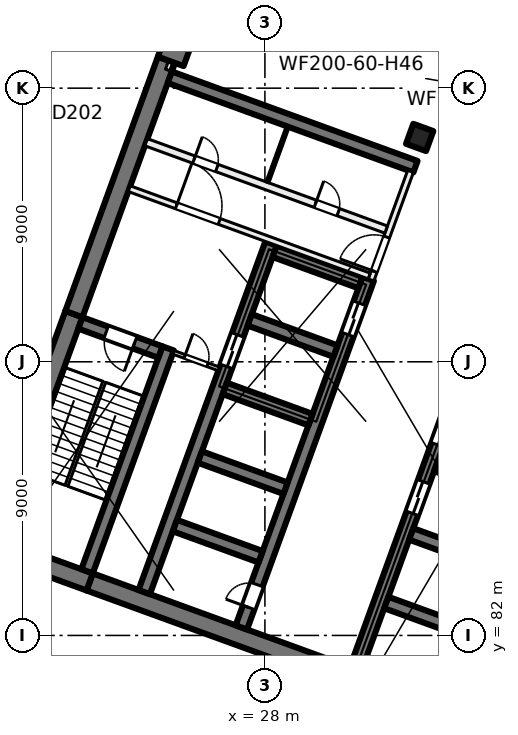
"""IFC4 building model, lengths in metres.
Left out: names, types, materials, properties, quantities, classifications, styles, units other than length and angle.
Written with IfcOpenShell. Run it as: python <this file> out.ifc"""

import sys

from ifc_helpers import new_model, si_unit, direction, frame, frame_2d, origin, origin_2d, place, context, subcontext, project, spatial, rectangle, extrude, element, fill, save


model = new_model("IFC4")
c1 = context("Model", 3, precision=1e-05, world=origin(), true_north=direction((0.0, 1.0)))
c2 = subcontext(c1, "Body", "Model", "MODEL_VIEW")
j1 = project(units=[si_unit("LENGTHUNIT", "METRE"), si_unit("PLANEANGLEUNIT", "RADIAN")], contexts=[c1])
p1 = place(None, origin())
s1 = spatial("IfcSite", under=j1, at=p1, CompositionType="ELEMENT")
p2 = place(p1, origin())
s2 = spatial("IfcBuilding", under=s1, at=p2, CompositionType="ELEMENT")
p3 = place(p2, frame((0.0, 0.0, 12.5)))
s3 = spatial("IfcBuildingStorey", under=s2, at=p3, CompositionType="ELEMENT", Elevation=12.5)
p4 = place(p3, frame((33.091, 98.379, 0.0), z_axis=(0.0, 0.0, 1.0), x_axis=(-0.342020143326, -0.939692620786, 0.0)))
e1 = element("IfcColumn", 1, at=p4, inside=s3, PredefinedType="COLUMN", context=c2, shape_type="SweptSolid", body=[
    extrude(rectangle(XDim=0.7, YDim=0.7, at=origin_2d()), origin(), (0.0, 0.0, 1.0), 5.0),
])
p5 = place(p3, frame((25.056, 101.303, 0.0), z_axis=(0.0, 0.0, 1.0), x_axis=(-0.342020143326, -0.939692620786, 0.0)))
e2 = element("IfcColumn", 2, at=p5, inside=s3, PredefinedType="COLUMN", context=c2, shape_type="SweptSolid", body=[
    extrude(rectangle(XDim=0.9, YDim=0.9, at=origin_2d()), origin(), (0.0, 0.0, 1.0), 5.0),
])
p6 = place(p3, frame((35.767, 78.835, 0.0), z_axis=(0.0, 0.0, 1.0), x_axis=(-0.939692894512, 0.342019391267, 0.0)))
e3 = element("IfcWall", 3, at=p6, inside=s3, PredefinedType="SHEAR", context=c2, shape_type="SweptSolid", body=[
    extrude(rectangle(XDim=14.4, YDim=0.6, at=frame_2d((7.2, 0.0))), origin(), (0.0, 0.0, 1.0), 5.0),
])
p7 = place(p3, frame((22.236, 83.76, 0.0), z_axis=(0.0, 0.0, 1.0), x_axis=(-0.939680822529, 0.342052557032, 0.0)))
e4 = element("IfcWall", 4, at=p7, inside=s3, PredefinedType="SHEAR", context=c2, shape_type="SweptSolid", body=[
    extrude(rectangle(XDim=3.8, YDim=0.6, at=frame_2d((1.9, 0.0))), origin(), (0.0, 0.0, 1.0), 5.0),
])
p8 = place(p3, frame((19.05, 85.239, 0.0), z_axis=(0.0, 0.0, 1.0), x_axis=(0.342016982193, 0.939693771338, 0.0)))
e5 = element("IfcWall", 5, at=p8, inside=s3, PredefinedType="SHEAR", context=c2, shape_type="SweptSolid", body=[
    extrude(rectangle(XDim=7.8, YDim=0.6, at=frame_2d((3.9, 0.0))), origin(), (0.0, 0.0, 1.0), 5.0),
])
p9 = place(p3, frame((21.717, 92.568, 0.0), z_axis=(0.0, 0.0, 1.0), x_axis=(0.342016162452, 0.939694069696, 0.0)))
e6 = element("IfcWall", 6, at=p9, inside=s3, PredefinedType="SHEAR", context=c2, shape_type="SweptSolid", body=[
    extrude(rectangle(XDim=8.9, YDim=0.6, at=frame_2d((4.45, 0.0))), origin(), (0.0, 0.0, 1.0), 5.0),
])
p10 = place(p3, frame((22.15, 84.11, 0.0), z_axis=(0.0, 0.0, 1.0), x_axis=(0.342016982193, 0.939693771338, 0.0)))
e7 = element("IfcWall", 7, at=p10, inside=s3, PredefinedType="SHEAR", context=c2, shape_type="SweptSolid", body=[
    extrude(rectangle(XDim=7.8, YDim=0.4, at=frame_2d((3.9, 0.0))), origin(), (0.0, 0.0, 1.0), 5.0),
])
p11 = place(p3, frame((24.562, 91.32, 0.0), z_axis=(0.0, 0.0, 1.0), x_axis=(-0.939717030584, 0.341953070509, 0.0)))
e8 = element("IfcWall", 8, at=p11, inside=s3, PredefinedType="SHEAR", context=c2, shape_type="SweptSolid", body=[
    extrude(rectangle(XDim=2.8, YDim=0.4, at=frame_2d((1.4, 0.0))), origin(), (0.0, 0.0, 1.0), 5.0),
])
p12 = place(p11, frame((0.9, 0.0, 0.0)))
e9 = element("IfcOpeningElement", 9, at=p12, cuts=e8, PredefinedType="OPENING", context=c2, shape_type="SweptSolid", body=[
    extrude(rectangle(XDim=1.0, YDim=2.1, at=frame_2d((0.5, 1.05))), frame((0.0, 0.21, 0.0), z_axis=(0.0, -1.0, 0.0), x_axis=(1.0, 0.0, 0.0)), (0.0, 0.0, 1.0), 0.42),
])
p13 = place(p3, frame((30.984, 80.895, 0.0), z_axis=(0.0, 0.0, 1.0), x_axis=(0.342021021735, 0.939692301071, 0.0)))
e10 = element("IfcWall", 10, at=p13, inside=s3, PredefinedType="SHEAR", context=c2, shape_type="SweptSolid", body=[
    extrude(rectangle(XDim=12.2, YDim=0.4, at=frame_2d((6.1, 0.0))), origin(), (0.0, 0.0, 1.0), 5.0),
])
p14 = place(p13, frame((5.45, 0.0, 0.0)))
e11 = element("IfcOpeningElement", 11, at=p14, cuts=e10, PredefinedType="OPENING", context=c2, shape_type="SweptSolid", body=[
    extrude(rectangle(XDim=1.1, YDim=2.1, at=frame_2d((0.55, 1.05))), frame((0.0, 0.21, 0.0), z_axis=(0.0, -1.0, 0.0), x_axis=(1.0, 0.0, 0.0)), (0.0, 0.0, 1.0), 0.42),
])
p15 = place(p13, frame((7.85, 0.0, 0.0)))
e12 = element("IfcOpeningElement", 12, at=p15, cuts=e10, PredefinedType="OPENING", context=c2, shape_type="SweptSolid", body=[
    extrude(rectangle(XDim=1.1, YDim=2.1, at=frame_2d((0.55, 1.05))), frame((0.0, 0.21, 0.0), z_axis=(0.0, -1.0, 0.0), x_axis=(1.0, 0.0, 0.0)), (0.0, 0.0, 1.0), 0.42),
])
p16 = place(p13, frame((10.25, 0.0, 0.0)))
e13 = element("IfcOpeningElement", 13, at=p16, cuts=e10, PredefinedType="OPENING", context=c2, shape_type="SweptSolid", body=[
    extrude(rectangle(XDim=1.1, YDim=2.1, at=frame_2d((0.55, 1.05))), frame((0.0, 0.21, 0.0), z_axis=(0.0, -1.0, 0.0), x_axis=(1.0, 0.0, 0.0)), (0.0, 0.0, 1.0), 0.42),
])
for number, where, z_axis, x_axis in (
    (14, (34.812, 82.056, 0.0), (0.0, 0.0, 1.0), (-0.94, 0.342, 0.0)),
    (15, (35.632, 84.311, 0.0), (0.0, 0.0, 1.0), (-0.94, 0.342, 0.0)),
    (16, (36.453, 86.566, 0.0), (0.0, 0.0, 1.0), (-0.94, 0.342, 0.0)),
):
    element("IfcWall", number, at=place(p3, frame(where, z_axis=z_axis, x_axis=x_axis)), inside=s3, PredefinedType="SHEAR", context=c2, shape_type="SweptSolid", body=[
        extrude(rectangle(XDim=3.0, YDim=0.4, at=frame_2d((1.5, 0.0))), origin(), (0.0, 0.0, 1.0), 5.0),
    ])
p17 = place(p3, frame((27.225, 82.263, 0.0), z_axis=(0.0, 0.0, 1.0), x_axis=(0.342014590177, 0.939694641948, 0.0)))
e17 = element("IfcWall", 17, at=p17, inside=s3, PredefinedType="SHEAR", context=c2, shape_type="SweptSolid", body=[
    extrude(rectangle(XDim=12.2, YDim=0.4, at=frame_2d((6.1, 0.0))), origin(), (0.0, 0.0, 1.0), 5.0),
])
p18 = place(p17, frame((10.25, 0.0, 0.0)))
e18 = element("IfcOpeningElement", 18, at=p18, cuts=e17, PredefinedType="OPENING", context=c2, shape_type="SweptSolid", body=[
    extrude(rectangle(XDim=1.1, YDim=2.1, at=frame_2d((0.55, 1.05))), frame((0.0, 0.21, 0.0), z_axis=(0.0, -1.0, 0.0), x_axis=(1.0, 0.0, 0.0)), (0.0, 0.0, 1.0), 0.42),
])
p19 = place(p17, frame((0.7, 0.0, 0.0)))
e19 = element("IfcOpeningElement", 19, at=p19, cuts=e17, PredefinedType="OPENING", context=c2, shape_type="SweptSolid", body=[
    extrude(rectangle(XDim=0.8, YDim=2.1, at=frame_2d((0.4, 1.05))), frame((0.0, 0.21, 0.0), z_axis=(0.0, -1.0, 0.0), x_axis=(1.0, 0.0, 0.0)), (0.0, 0.0, 1.0), 0.42),
])
p20 = place(p3, frame((24.03, 83.426, 0.0), z_axis=(0.0, 0.0, 1.0), x_axis=(0.342014590177, 0.939694641948, 0.0)))
e20 = element("IfcWall", 20, at=p20, inside=s3, PredefinedType="SHEAR", context=c2, shape_type="SweptSolid", body=[
    extrude(rectangle(XDim=12.2, YDim=0.4, at=frame_2d((6.1, 0.0))), origin(), (0.0, 0.0, 1.0), 5.0),
])
p21 = place(p20, frame((7.9, 0.0, 0.0)))
e21 = element("IfcOpeningElement", 21, at=p21, cuts=e20, PredefinedType="OPENING", context=c2, shape_type="SweptSolid", body=[
    extrude(rectangle(XDim=1.1, YDim=2.1, at=frame_2d((0.55, 1.05))), frame((0.0, 0.21, 0.0), z_axis=(0.0, -1.0, 0.0), x_axis=(1.0, 0.0, 0.0)), (0.0, 0.0, 1.0), 0.42),
])
p22 = place(p3, frame((27.858, 84.587, 0.0), z_axis=(0.0, 0.0, 1.0), x_axis=(-0.939686455819, 0.342037080957, 0.0)))
e22 = element("IfcWall", 22, at=p22, inside=s3, PredefinedType="SHEAR", context=c2, shape_type="SweptSolid", body=[
    extrude(rectangle(XDim=3.0, YDim=0.4, at=frame_2d((1.5, 0.0))), origin(), (0.0, 0.0, 1.0), 5.0),
])
p23 = place(p3, frame((28.678, 86.842, 0.0), z_axis=(0.0, 0.0, 1.0), x_axis=(-0.939676934218, 0.342063238742, 0.0)))
e23 = element("IfcWall", 23, at=p23, inside=s3, PredefinedType="SHEAR", context=c2, shape_type="SweptSolid", body=[
    extrude(rectangle(XDim=3.0, YDim=0.4, at=frame_2d((1.5, 0.0))), origin(), (0.0, 0.0, 1.0), 5.0),
])
for number, where, z_axis, x_axis in (
    (24, (29.5, 89.097, 0.0), (0.0, 0.0, 1.0), (-0.94, 0.342, 0.0)),
    (25, (30.32, 91.353, 0.0), (0.0, 0.0, 1.0), (-0.94, 0.342, 0.0)),
    (26, (31.141, 93.608, 0.0), (0.0, 0.0, 1.0), (-0.94, 0.342, 0.0)),
):
    element("IfcWall", number, at=place(p3, frame(where, z_axis=z_axis, x_axis=x_axis)), inside=s3, PredefinedType="SHEAR", context=c2, shape_type="SweptSolid", body=[
        extrude(rectangle(XDim=3.0, YDim=0.4, at=frame_2d((1.5, 0.0))), origin(), (0.0, 0.0, 1.0), 5.0),
    ])
p24 = place(p3, frame((32.953, 97.418, 0.0), z_axis=(0.0, 0.0, 1.0), x_axis=(-0.93969060187, 0.342025690201, 0.0)))
e27 = element("IfcWall", 27, at=p24, inside=s3, PredefinedType="SHEAR", context=c2, shape_type="SweptSolid", body=[
    extrude(rectangle(XDim=8.6, YDim=0.4, at=frame_2d((4.3, 0.0))), origin(), (0.0, 0.0, 1.0), 5.0),
])
p25 = place(p3, frame((12.199, 89.809, 0.0), z_axis=(0.0, 0.0, 1.0), x_axis=(0.342022998908, 0.939691581434, 0.0)))
e28 = element("IfcWall", 28, at=p25, inside=s3, PredefinedType="SOLIDWALL", context=c2, shape_type="SweptSolid", body=[
    extrude(rectangle(XDim=47.334, YDim=0.6, at=frame_2d((23.667, 0.0))), origin(), (0.0, 0.0, 1.0), 4.6),
])
p26 = place(p25, frame((0.773, 0.0, 0.9)))
e29 = element("IfcOpeningElement", 29, at=p26, cuts=e28, PredefinedType="OPENING", context=c2, shape_type="SweptSolid", body=[
    extrude(rectangle(XDim=3.0, YDim=3.0, at=frame_2d((1.5, 1.5))), frame((0.0, 0.31, 0.0), z_axis=(0.0, -1.0, 0.0), x_axis=(1.0, 0.0, 0.0)), (0.0, 0.0, 1.0), 0.62),
])
p27 = place(p25, frame((5.379, 0.0, 0.9)))
e30 = element("IfcOpeningElement", 30, at=p27, cuts=e28, PredefinedType="OPENING", context=c2, shape_type="SweptSolid", body=[
    extrude(rectangle(XDim=3.0, YDim=3.0, at=frame_2d((1.5, 1.5))), frame((0.0, 0.31, 0.0), z_axis=(0.0, -1.0, 0.0), x_axis=(1.0, 0.0, 0.0)), (0.0, 0.0, 1.0), 0.62),
])
p28 = place(p25, frame((9.235, 0.0, 0.9)))
e31 = element("IfcOpeningElement", 31, at=p28, cuts=e28, PredefinedType="OPENING", context=c2, shape_type="SweptSolid", body=[
    extrude(rectangle(XDim=3.0, YDim=3.0, at=frame_2d((1.5, 1.5))), frame((0.0, 0.31, 0.0), z_axis=(0.0, -1.0, 0.0), x_axis=(1.0, 0.0, 0.0)), (0.0, 0.0, 1.0), 0.62),
])
p29 = place(p25, frame((14.786, 0.0, 0.9)))
e32 = element("IfcOpeningElement", 32, at=p29, cuts=e28, PredefinedType="OPENING", context=c2, shape_type="SweptSolid", body=[
    extrude(rectangle(XDim=1.2, YDim=3.0, at=frame_2d((0.6, 1.5))), frame((0.0, 0.31, 0.0), z_axis=(0.0, -1.0, 0.0), x_axis=(1.0, 0.0, 0.0)), (0.0, 0.0, 1.0), 0.62),
])
p30 = place(p25, frame((16.286, 0.0, 0.9)))
e33 = element("IfcOpeningElement", 33, at=p30, cuts=e28, PredefinedType="OPENING", context=c2, shape_type="SweptSolid", body=[
    extrude(rectangle(XDim=1.2, YDim=3.0, at=frame_2d((0.6, 1.5))), frame((0.0, 0.31, 0.0), z_axis=(0.0, -1.0, 0.0), x_axis=(1.0, 0.0, 0.0)), (0.0, 0.0, 1.0), 0.62),
])
p31 = place(p25, frame((18.118, 0.0, 0.9)))
e34 = element("IfcOpeningElement", 34, at=p31, cuts=e28, PredefinedType="OPENING", context=c2, shape_type="SweptSolid", body=[
    extrude(rectangle(XDim=1.2, YDim=3.0, at=frame_2d((0.6, 1.5))), frame((0.0, 0.31, 0.0), z_axis=(0.0, -1.0, 0.0), x_axis=(1.0, 0.0, 0.0)), (0.0, 0.0, 1.0), 0.62),
])
p32 = place(p25, frame((19.618, 0.0, 0.9)))
e35 = element("IfcOpeningElement", 35, at=p32, cuts=e28, PredefinedType="OPENING", context=c2, shape_type="SweptSolid", body=[
    extrude(rectangle(XDim=1.2, YDim=3.0, at=frame_2d((0.6, 1.5))), frame((0.0, 0.31, 0.0), z_axis=(0.0, -1.0, 0.0), x_axis=(1.0, 0.0, 0.0)), (0.0, 0.0, 1.0), 0.62),
])
p33 = place(p25, frame((22.452, 0.0, 0.9)))
e36 = element("IfcOpeningElement", 36, at=p33, cuts=e28, PredefinedType="OPENING", context=c2, shape_type="SweptSolid", body=[
    extrude(rectangle(XDim=3.0, YDim=3.0, at=frame_2d((1.5, 1.5))), frame((0.0, 0.31, 0.0), z_axis=(0.0, -1.0, 0.0), x_axis=(1.0, 0.0, 0.0)), (0.0, 0.0, 1.0), 0.62),
])
p34 = place(p25, frame((26.458, 0.0, 0.9)))
e37 = element("IfcOpeningElement", 37, at=p34, cuts=e28, PredefinedType="OPENING", context=c2, shape_type="SweptSolid", body=[
    extrude(rectangle(XDim=3.0, YDim=3.0, at=frame_2d((1.5, 1.5))), frame((0.0, 0.31, 0.0), z_axis=(0.0, -1.0, 0.0), x_axis=(1.0, 0.0, 0.0)), (0.0, 0.0, 1.0), 0.62),
])
p35 = place(p25, frame((31.064, 0.0, 0.9)))
e38 = element("IfcOpeningElement", 38, at=p35, cuts=e28, PredefinedType="OPENING", context=c2, shape_type="SweptSolid", body=[
    extrude(rectangle(XDim=3.0, YDim=3.0, at=frame_2d((1.5, 1.5))), frame((0.0, 0.31, 0.0), z_axis=(0.0, -1.0, 0.0), x_axis=(1.0, 0.0, 0.0)), (0.0, 0.0, 1.0), 0.62),
])
p36 = place(p25, frame((36.029, 0.0, 0.9)))
e39 = element("IfcOpeningElement", 39, at=p36, cuts=e28, PredefinedType="OPENING", context=c2, shape_type="SweptSolid", body=[
    extrude(rectangle(XDim=1.2, YDim=3.0, at=frame_2d((0.6, 1.5))), frame((0.0, 0.31, 0.0), z_axis=(0.0, -1.0, 0.0), x_axis=(1.0, 0.0, 0.0)), (0.0, 0.0, 1.0), 0.62),
])
p37 = place(p25, frame((39.676, 0.0, 0.9)))
e40 = element("IfcOpeningElement", 40, at=p37, cuts=e28, PredefinedType="OPENING", context=c2, shape_type="SweptSolid", body=[
    extrude(rectangle(XDim=3.0, YDim=3.0, at=frame_2d((1.5, 1.5))), frame((0.0, 0.31, 0.0), z_axis=(0.0, -1.0, 0.0), x_axis=(1.0, 0.0, 0.0)), (0.0, 0.0, 1.0), 0.62),
])
p38 = place(p25, frame((43.531, 0.0, 0.9)))
e41 = element("IfcOpeningElement", 41, at=p38, cuts=e28, PredefinedType="OPENING", context=c2, shape_type="SweptSolid", body=[
    extrude(rectangle(XDim=3.0, YDim=3.0, at=frame_2d((1.5, 1.5))), frame((0.0, 0.31, 0.0), z_axis=(0.0, -1.0, 0.0), x_axis=(1.0, 0.0, 0.0)), (0.0, 0.0, 1.0), 0.62),
])
p39 = place(p3, frame((31.491, 93.693, 0.0), z_axis=(0.0, 0.0, 1.0), x_axis=(0.341995824804, 0.939701471648, 0.0)))
e42 = element("IfcWall", 42, at=p39, inside=s3, PredefinedType="PARTITIONING", context=c2, shape_type="SweptSolid", body=[
    extrude(rectangle(XDim=3.8, YDim=0.2, at=frame_2d((1.9, 0.0))), origin(), (0.0, 0.0, 1.0), 4.6),
])
p40 = place(p39, frame((0.3, 0.0, 0.0)))
e43 = element("IfcOpeningElement", 43, at=p40, cuts=e42, PredefinedType="OPENING", context=c2, shape_type="SweptSolid", body=[
    extrude(rectangle(XDim=1.2, YDim=2.1, at=frame_2d((0.6, 1.05))), frame((0.0, 0.11, 0.0), z_axis=(0.0, -1.0, 0.0), x_axis=(1.0, 0.0, 0.0)), (0.0, 0.0, 1.0), 0.22),
])
p41 = place(p3, frame((23.538, 96.694, 0.0), z_axis=(0.0, 0.0, 1.0), x_axis=(0.939691552312, -0.342023078919, 0.0)))
e44 = element("IfcWall", 44, at=p41, inside=s3, PredefinedType="PARTITIONING", context=c2, shape_type="SweptSolid", body=[
    extrude(rectangle(XDim=8.4, YDim=0.2, at=frame_2d((4.2, 0.0))), origin(), (0.0, 0.0, 1.0), 4.6),
])
p42 = place(p41, frame((1.65, 0.0, 0.0)))
e45 = element("IfcOpeningElement", 45, at=p42, cuts=e44, PredefinedType="OPENING", context=c2, shape_type="SweptSolid", body=[
    extrude(rectangle(XDim=1.5, YDim=2.1, at=frame_2d((0.75, 1.05))), frame((0.0, 0.11, 0.0), z_axis=(0.0, -1.0, 0.0), x_axis=(1.0, 0.0, 0.0)), (0.0, 0.0, 1.0), 0.22),
])
p43 = place(p3, frame((24.094, 98.221, 0.0), z_axis=(0.0, 0.0, 1.0), x_axis=(0.939691552312, -0.342023078919, 0.0)))
e46 = element("IfcWall", 46, at=p43, inside=s3, PredefinedType="PARTITIONING", context=c2, shape_type="SweptSolid", body=[
    extrude(rectangle(XDim=8.4, YDim=0.25, at=frame_2d((4.2, 0.0))), origin(), (0.0, 0.0, 1.0), 4.6),
])
p44 = place(p43, frame((5.925, 0.0, 0.0)))
e47 = element("IfcOpeningElement", 47, at=p44, cuts=e46, PredefinedType="OPENING", context=c2, shape_type="SweptSolid", body=[
    extrude(rectangle(XDim=0.8, YDim=2.1, at=frame_2d((0.4, 1.05))), frame((0.0, 0.135, 0.0), z_axis=(0.0, -1.0, 0.0), x_axis=(1.0, 0.0, 0.0)), (0.0, 0.0, 1.0), 0.27),
])
p45 = place(p43, frame((1.675, 0.0, 0.0)))
e48 = element("IfcOpeningElement", 48, at=p45, cuts=e46, PredefinedType="OPENING", context=c2, shape_type="SweptSolid", body=[
    extrude(rectangle(XDim=0.8, YDim=2.1, at=frame_2d((0.4, 1.05))), frame((0.0, 0.135, 0.0), z_axis=(0.0, -1.0, 0.0), x_axis=(1.0, 0.0, 0.0)), (0.0, 0.0, 1.0), 0.27),
])
p46 = place(p3, frame((24.985, 91.312, 0.0), z_axis=(0.0, 0.0, 1.0), x_axis=(0.939708740826, -0.341975850632, 0.0)))
e49 = element("IfcWall", 49, at=p46, inside=s3, PredefinedType="PARTITIONING", context=c2, shape_type="SweptSolid", body=[
    extrude(rectangle(XDim=1.6, YDim=0.125, at=frame_2d((0.8, 0.0))), origin(), (0.0, 0.0, 1.0), 4.6),
])
p47 = place(p46, frame((0.4, 0.0, 0.0)))
e50 = element("IfcOpeningElement", 50, at=p47, cuts=e49, PredefinedType="OPENING", context=c2, shape_type="SweptSolid", body=[
    extrude(rectangle(XDim=0.8, YDim=2.1, at=frame_2d((0.4, 1.05))), frame((0.0, 0.073, 0.0), z_axis=(0.0, -1.0, 0.0), x_axis=(1.0, 0.0, 0.0)), (0.0, 0.0, 1.0), 0.145),
])
p48 = place(p3, frame((28.083, 96.902, 0.0), z_axis=(0.0, 0.0, 1.0), x_axis=(0.342024501273, 0.939691034611, 0.0)))
e51 = element("IfcWall", 51, at=p48, inside=s3, PredefinedType="PARTITIONING", context=c2, shape_type="SweptSolid", body=[
    extrude(rectangle(XDim=1.95, YDim=0.1, at=frame_2d((0.975, 0.0))), origin(), (0.0, 0.0, 1.0), 4.6),
])
p49 = place(p3, frame((24.8, 100.598, 0.0), z_axis=(0.0, 0.0, 1.0), x_axis=(0.34194689438, 0.939719277989, 0.0)))
e52 = element("IfcWall", 52, at=p49, inside=s3, PredefinedType="PARTITIONING", context=c2, shape_type="SweptSolid", body=[
    extrude(rectangle(XDim=5.001, YDim=0.15, at=frame_2d((2.5, 0.0))), origin(), (0.0, 0.0, 1.0), 4.6),
])
p50 = place(p18, origin())
e53 = element("IfcDoor", 53, at=p50, inside=s3, OperationType="DOUBLE_DOOR_SLIDING", PredefinedType="DOOR", context=c2, shape_type="SweptSolid", body=[
    extrude(rectangle(XDim=1.1, YDim=2.1, at=frame_2d((0.55, 1.05))), frame((0.0, 0.025, 0.0), z_axis=(0.0, -1.0, 0.0), x_axis=(1.0, 0.0, 0.0)), (0.0, 0.0, 1.0), 0.05),
])
fill(e18, e53)
p51 = place(p14, origin())
e54 = element("IfcDoor", 54, at=p51, inside=s3, OperationType="DOUBLE_DOOR_SLIDING", PredefinedType="DOOR", context=c2, shape_type="SweptSolid", body=[
    extrude(rectangle(XDim=1.1, YDim=2.1, at=frame_2d((0.55, 1.05))), frame((0.0, 0.025, 0.0), z_axis=(0.0, -1.0, 0.0), x_axis=(1.0, 0.0, 0.0)), (0.0, 0.0, 1.0), 0.05),
])
fill(e11, e54)
p52 = place(p15, origin())
e55 = element("IfcDoor", 55, at=p52, inside=s3, OperationType="DOUBLE_DOOR_SLIDING", PredefinedType="DOOR", context=c2, shape_type="SweptSolid", body=[
    extrude(rectangle(XDim=1.1, YDim=2.1, at=frame_2d((0.55, 1.05))), frame((0.0, 0.025, 0.0), z_axis=(0.0, -1.0, 0.0), x_axis=(1.0, 0.0, 0.0)), (0.0, 0.0, 1.0), 0.05),
])
fill(e12, e55)
p53 = place(p19, origin())
e56 = element("IfcDoor", 56, at=p53, inside=s3, OperationType="SINGLE_SWING_LEFT", PredefinedType="DOOR", context=c2, shape_type="SweptSolid", body=[
    extrude(rectangle(XDim=0.8, YDim=2.1, at=frame_2d((0.4, 1.05))), frame((0.0, 0.025, 0.0), z_axis=(0.0, -1.0, 0.0), x_axis=(1.0, 0.0, 0.0)), (0.0, 0.0, 1.0), 0.05),
])
fill(e19, e56)
p54 = place(p40, origin())
e57 = element("IfcDoor", 57, at=p54, inside=s3, OperationType="DOUBLE_DOOR_SINGLE_SWING", PredefinedType="DOOR", context=c2, shape_type="SweptSolid", body=[
    extrude(rectangle(XDim=1.2, YDim=2.1, at=frame_2d((0.6, 1.05))), frame((0.0, 0.025, 0.0), z_axis=(0.0, -1.0, 0.0), x_axis=(1.0, 0.0, 0.0)), (0.0, 0.0, 1.0), 0.05),
])
fill(e43, e57)
p55 = place(p42, origin())
e58 = element("IfcDoor", 58, at=p55, inside=s3, OperationType="DOUBLE_DOOR_SINGLE_SWING", PredefinedType="DOOR", context=c2, shape_type="SweptSolid", body=[
    extrude(rectangle(XDim=1.5, YDim=2.1, at=frame_2d((0.75, 1.05))), frame((0.0, 0.025, 0.0), z_axis=(0.0, -1.0, 0.0), x_axis=(1.0, 0.0, 0.0)), (0.0, 0.0, 1.0), 0.05),
])
fill(e45, e58)
p56 = place(p12, origin())
e59 = element("IfcDoor", 59, at=p56, inside=s3, OperationType="SINGLE_SWING_LEFT", PredefinedType="DOOR", context=c2, shape_type="SweptSolid", body=[
    extrude(rectangle(XDim=1.0, YDim=2.1, at=frame_2d((0.5, 1.05))), frame((0.0, 0.025, 0.0), z_axis=(0.0, -1.0, 0.0), x_axis=(1.0, 0.0, 0.0)), (0.0, 0.0, 1.0), 0.05),
])
fill(e9, e59)
p57 = place(p47, origin())
e60 = element("IfcDoor", 60, at=p57, inside=s3, OperationType="SINGLE_SWING_RIGHT", PredefinedType="DOOR", context=c2, shape_type="SweptSolid", body=[
    extrude(rectangle(XDim=0.8, YDim=2.1, at=frame_2d((0.4, 1.05))), frame((0.0, 0.025, 0.0), z_axis=(0.0, -1.0, 0.0), x_axis=(1.0, 0.0, 0.0)), (0.0, 0.0, 1.0), 0.05),
])
fill(e50, e60)
p58 = place(p44, origin())
e61 = element("IfcDoor", 61, at=p58, inside=s3, OperationType="SINGLE_SWING_LEFT", PredefinedType="DOOR", context=c2, shape_type="SweptSolid", body=[
    extrude(rectangle(XDim=0.8, YDim=2.1, at=frame_2d((0.4, 1.05))), frame((0.0, 0.025, 0.0), z_axis=(0.0, -1.0, 0.0), x_axis=(1.0, 0.0, 0.0)), (0.0, 0.0, 1.0), 0.05),
])
fill(e47, e61)
p59 = place(p45, origin())
e62 = element("IfcDoor", 62, at=p59, inside=s3, OperationType="SINGLE_SWING_RIGHT", PredefinedType="DOOR", context=c2, shape_type="SweptSolid", body=[
    extrude(rectangle(XDim=0.8, YDim=2.1, at=frame_2d((0.4, 1.05))), frame((0.0, 0.025, 0.0), z_axis=(0.0, -1.0, 0.0), x_axis=(1.0, 0.0, 0.0)), (0.0, 0.0, 1.0), 0.05),
])
fill(e48, e62)
p60 = place(p21, origin())
e63 = element("IfcDoor", 63, at=p60, inside=s3, OperationType="DOUBLE_DOOR_SLIDING", PredefinedType="DOOR", context=c2, shape_type="SweptSolid", body=[
    extrude(rectangle(XDim=1.1, YDim=2.1, at=frame_2d((0.55, 1.05))), frame((0.0, 0.025, 0.0), z_axis=(0.0, -1.0, 0.0), x_axis=(1.0, 0.0, 0.0)), (0.0, 0.0, 1.0), 0.05),
])
fill(e21, e63)
save(model, sys.argv[1])
